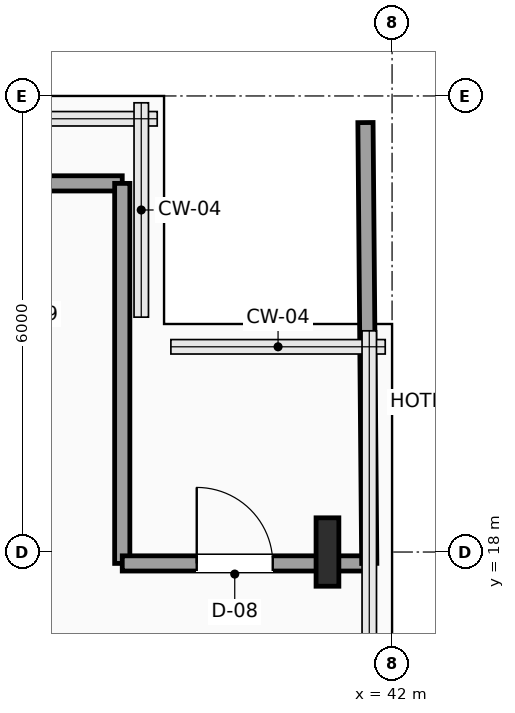
"""IFC4 building model, lengths in metres.
Left out: names, types, materials, properties, quantities, classifications, styles, units other than length and angle.
Written with IfcOpenShell. Run it as: python <this file> out.ifc"""

import sys

from ifc_helpers import new_model, si_unit, direction, frame, frame_2d, origin, origin_2d, place, context, subcontext, project, spatial, rectangle, i_section, extrude, element, fill, save


model = new_model("IFC4")
c1 = context("Model", 3, precision=1e-05, world=origin(), true_north=direction((0.0, 1.0)))
c2 = subcontext(c1, "Body", "Model", "MODEL_VIEW")
j1 = project(units=[si_unit("LENGTHUNIT", "METRE"), si_unit("PLANEANGLEUNIT", "RADIAN")], contexts=[c1])
p1 = place(None, origin())
s1 = spatial("IfcSite", under=j1, at=p1, CompositionType="ELEMENT")
p2 = place(p1, origin())
s2 = spatial("IfcBuilding", under=s1, at=p2, CompositionType="ELEMENT")
p3 = place(p2, frame((0.0, 0.0, 176.7)))
s3 = spatial("IfcBuildingStorey", under=s2, at=p3, CompositionType="ELEMENT", Elevation=176.7)
p4 = place(p3, frame((41.15, 18.0, 0.0), z_axis=(0.0, 0.0, 1.0), x_axis=(1.0, 0.0, 0.0)))
e1 = element("IfcColumn", 1, at=p4, inside=s3, PredefinedType="COLUMN", context=c2, shape_type="SweptSolid", body=[
    extrude(i_section(OverallWidth=0.3, OverallDepth=0.9, WebThickness=0.019, FlangeThickness=0.035, FilletRadius=0.03, at=origin_2d()), origin(), (0.0, 0.0, 1.0), 3.75),
])
p5 = place(p3, frame((36.35, 22.85, 0.0), z_axis=(0.0, 0.0, 1.0), x_axis=(1.0, 0.0, 0.0)))
e2 = element("IfcWall", 2, at=p5, inside=s3, PredefinedType="PARTITIONING", context=c2, shape_type="SweptSolid", body=[
    extrude(rectangle(XDim=2.1, YDim=0.2, at=frame_2d((1.05, 0.0))), origin(), (0.0, 0.0, 1.0), 3.54),
])
p6 = place(p3, frame((38.45, 22.85, 0.0), z_axis=(0.0, 0.0, 1.0), x_axis=(0.0, -1.0, 0.0)))
e3 = element("IfcWall", 3, at=p6, inside=s3, PredefinedType="PARTITIONING", context=c2, shape_type="SweptSolid", body=[
    extrude(rectangle(XDim=5.0, YDim=0.2, at=frame_2d((2.5, 0.0))), origin(), (0.0, 0.0, 1.0), 3.54),
])
p7 = place(p3, frame((38.45, 17.85, 0.0), z_axis=(0.0, 0.0, 1.0), x_axis=(1.0, 0.0, 0.0)))
e4 = element("IfcWall", 4, at=p7, inside=s3, PredefinedType="PARTITIONING", context=c2, shape_type="SweptSolid", body=[
    extrude(rectangle(XDim=3.25, YDim=0.2, at=frame_2d((1.625, 0.0))), origin(), (0.0, 0.0, 1.0), 3.132),
])
p8 = place(p7, frame((0.98, 0.0, 0.0)))
e5 = element("IfcOpeningElement", 5, at=p8, cuts=e4, PredefinedType="OPENING", context=c2, shape_type="SweptSolid", body=[
    extrude(rectangle(XDim=1.0, YDim=2.2, at=frame_2d((0.5, 1.1))), frame((0.0, 0.11, 0.0), z_axis=(0.0, -1.0, 0.0), x_axis=(1.0, 0.0, 0.0)), (0.0, 0.0, 1.0), 0.22),
])
p9 = place(p3, frame((41.7, 17.85, 0.0), z_axis=(0.0, 0.0, 1.0), x_axis=(-0.008629077606, 0.999962768817, 0.0)))
e6 = element("IfcWall", 6, at=p9, inside=s3, PredefinedType="PARTITIONING", context=c2, shape_type="SweptSolid", body=[
    extrude(rectangle(XDim=5.8, YDim=0.2, at=frame_2d((2.9, 0.0))), origin(), (0.0, 0.0, 1.0), 3.54),
])
p10 = place(p8, origin())
e7 = element("IfcDoor", 7, at=p10, inside=s3, OperationType="SINGLE_SWING_LEFT", PredefinedType="DOOR", context=c2, shape_type="SweptSolid", body=[
    extrude(rectangle(XDim=1.0, YDim=2.2, at=frame_2d((0.5, 1.1))), frame((0.0, 0.025, 0.0), z_axis=(0.0, -1.0, 0.0), x_axis=(1.0, 0.0, 0.0)), (0.0, 0.0, 1.0), 0.05),
])
fill(e5, e7)
save(model, sys.argv[1])
